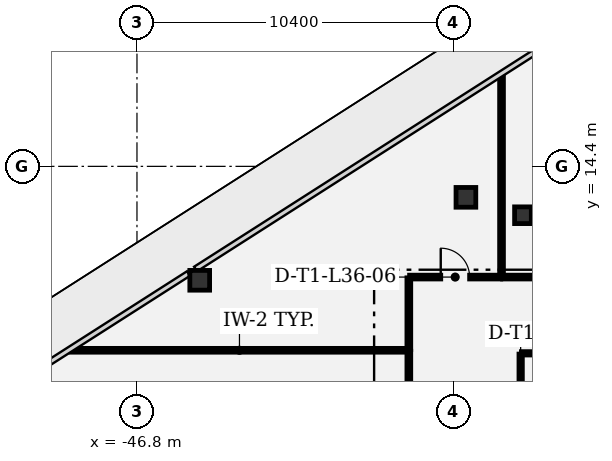
"""IFC4 building model, lengths in metres.
Left out: names, types, materials, properties, quantities, classifications, styles, units other than length and angle.
Written with IfcOpenShell. Run it as: python <this file> out.ifc"""

import sys

from ifc_helpers import new_model, si_unit, direction, frame, frame_2d, origin, origin_2d, place, context, subcontext, project, spatial, rectangle, extrude, element, fill, save


model = new_model("IFC4")
c1 = context("Model", 3, precision=1e-05, world=origin(), true_north=direction((0.0, 1.0)))
c2 = subcontext(c1, "Body", "Model", "MODEL_VIEW")
j1 = project(units=[si_unit("LENGTHUNIT", "METRE"), si_unit("PLANEANGLEUNIT", "RADIAN")], contexts=[c1])
p1 = place(None, origin())
s1 = spatial("IfcSite", under=j1, at=p1, CompositionType="ELEMENT")
p2 = place(p1, origin())
s2 = spatial("IfcBuilding", under=s1, at=p2, CompositionType="ELEMENT")
p3 = place(p2, frame((0.0, 0.0, 158.4)))
s3 = spatial("IfcBuildingStorey", under=s2, at=p3, CompositionType="ELEMENT", Elevation=158.4)
for number, where, z_axis, x_axis in (
    (1, (-44.736, 10.652, 0.0), (0.0, 0.0, 1.0), (1.0, 0.0, 0.0)),
    (2, (-35.981, 13.381, 0.0), (0.0, 0.0, 1.0), (1.0, 0.0, 0.0)),
):
    element("IfcColumn", number, at=place(p3, frame(where, z_axis=z_axis, x_axis=x_axis)), inside=s3, PredefinedType="COLUMN", context=c2, shape_type="SweptSolid", body=[
        extrude(rectangle(XDim=0.65, YDim=0.65, at=origin_2d()), origin(), (0.0, 0.0, 1.0), 4.05),
    ])
p4 = place(p3, frame((-34.104, 12.792, 0.0), z_axis=(0.0, 0.0, 1.0), x_axis=(1.0, 0.0, 0.0)))
e3 = element("IfcColumn", 3, at=p4, inside=s3, PredefinedType="COLUMN", context=c2, shape_type="SweptSolid", body=[
    extrude(rectangle(XDim=0.55, YDim=0.55, at=origin_2d()), origin(), (0.0, 0.0, 1.0), 4.05),
])
p5 = place(p3, frame((-34.18, 8.225, 0.0), z_axis=(0.0, 0.0, 1.0), x_axis=(0.0, -1.0, 0.0)))
e4 = element("IfcWall", 4, at=p5, inside=s3, PredefinedType="PARTITIONING", context=c2, shape_type="SweptSolid", body=[
    extrude(rectangle(XDim=3.15, YDim=0.11, at=frame_2d((1.575, 0.0))), origin(), (0.0, 0.0, 1.0), 3.78),
])
p6 = place(p5, frame((1.135, 0.0, 0.0)))
e5 = element("IfcOpeningElement", 5, at=p6, cuts=e4, PredefinedType="OPENING", context=c2, shape_type="SweptSolid", body=[
    extrude(rectangle(XDim=0.88, YDim=2.1, at=frame_2d((0.44, 1.05))), frame((0.0, 0.065, 0.0), z_axis=(0.0, -1.0, 0.0), x_axis=(1.0, 0.0, 0.0)), (0.0, 0.0, 1.0), 0.13),
])
p7 = place(p3, frame((-30.905, 8.25, 0.0), z_axis=(0.0, 0.0, 1.0), x_axis=(-1.0, 0.0, 0.0)))
e6 = element("IfcWall", 6, at=p7, inside=s3, PredefinedType="PARTITIONING", context=c2, shape_type="SweptSolid", body=[
    extrude(rectangle(XDim=3.25, YDim=0.11, at=frame_2d((1.625, 0.0))), origin(), (0.0, 0.0, 1.0), 3.78),
])
p8 = place(p3, frame((-48.975, 8.35, 0.0), z_axis=(0.0, 0.0, 1.0), x_axis=(1.0, 0.0, 0.0)))
e7 = element("IfcWall", 7, at=p8, inside=s3, PredefinedType="PARTITIONING", context=c2, shape_type="SweptSolid", body=[
    extrude(rectangle(XDim=11.092, YDim=0.125, at=frame_2d((5.546, 0.0))), origin(), (0.0, 0.0, 1.0), 2.9),
])
p9 = place(p3, frame((-37.858, 8.375, 0.0), z_axis=(0.0, 0.0, 1.0), x_axis=(0.0, 1.0, 0.0)))
e8 = element("IfcWall", 8, at=p9, inside=s3, PredefinedType="PARTITIONING", context=c2, shape_type="SweptSolid", body=[
    extrude(rectangle(XDim=2.358, YDim=0.125, at=frame_2d((1.179, 0.0))), origin(), (0.0, 0.0, 1.0), 3.78),
])
p10 = place(p3, frame((-37.833, 10.758, 0.0), z_axis=(0.0, 0.0, 1.0), x_axis=(1.0, 0.0, 0.0)))
e9 = element("IfcWall", 9, at=p10, inside=s3, PredefinedType="PARTITIONING", context=c2, shape_type="SweptSolid", body=[
    extrude(rectangle(XDim=2.999, YDim=0.125, at=frame_2d((1.5, 0.0))), origin(), (0.0, 0.0, 1.0), 3.344),
])
p11 = place(p10, frame((1.024, 0.0, 0.0)))
e10 = element("IfcOpeningElement", 10, at=p11, cuts=e9, PredefinedType="OPENING", context=c2, shape_type="SweptSolid", body=[
    extrude(rectangle(XDim=0.95, YDim=2.15, at=frame_2d((0.475, 1.075))), frame((0.0, 0.073, 0.0), z_axis=(0.0, -1.0, 0.0), x_axis=(1.0, 0.0, 0.0)), (0.0, 0.0, 1.0), 0.145),
])
p12 = place(p3, frame((-34.809, 10.783, 0.0), z_axis=(0.0, 0.0, 1.0), x_axis=(0.0, 1.0, 0.0)))
e11 = element("IfcWall", 11, at=p12, inside=s3, PredefinedType="PARTITIONING", context=c2, shape_type="SweptSolid", body=[
    extrude(rectangle(XDim=6.592, YDim=0.125, at=frame_2d((3.296, 0.0))), origin(), (0.0, 0.0, 1.0), 3.78),
])
p13 = place(p3, frame((-34.776, 10.758, 0.0), z_axis=(0.0, 0.0, 1.0), x_axis=(1.0, 0.0, 0.0)))
e12 = element("IfcWall", 12, at=p13, inside=s3, PredefinedType="PARTITIONING", context=c2, shape_type="SweptSolid", body=[
    extrude(rectangle(XDim=6.144, YDim=0.125, at=frame_2d((3.072, 0.0))), origin(), (0.0, 0.0, 1.0), 3.344),
])
p14 = place(p3, frame((-37.858, 4.783, 0.0), z_axis=(0.0, 0.0, 1.0), x_axis=(0.0, 1.0, 0.0)))
e13 = element("IfcWall", 13, at=p14, inside=s3, PredefinedType="PARTITIONING", context=c2, shape_type="SweptSolid", body=[
    extrude(rectangle(XDim=3.534, YDim=0.125, at=frame_2d((1.767, 0.0))), origin(), (0.0, 0.0, 1.0), 3.78),
])
p15 = place(p14, frame((1.292, 0.0, 0.0)))
e14 = element("IfcOpeningElement", 14, at=p15, cuts=e13, PredefinedType="OPENING", context=c2, shape_type="SweptSolid", body=[
    extrude(rectangle(XDim=0.95, YDim=2.15, at=frame_2d((0.475, 1.075))), frame((0.0, 0.073, 0.0), z_axis=(0.0, -1.0, 0.0), x_axis=(1.0, 0.0, 0.0)), (0.0, 0.0, 1.0), 0.145),
])
p16 = place(p11, origin())
e15 = element("IfcDoor", 15, at=p16, inside=s3, OperationType="SINGLE_SWING_LEFT", PredefinedType="DOOR", context=c2, shape_type="SweptSolid", body=[
    extrude(rectangle(XDim=0.95, YDim=2.15, at=frame_2d((0.475, 1.075))), frame((0.0, 0.025, 0.0), z_axis=(0.0, -1.0, 0.0), x_axis=(1.0, 0.0, 0.0)), (0.0, 0.0, 1.0), 0.05),
])
fill(e10, e15)
save(model, sys.argv[1])
